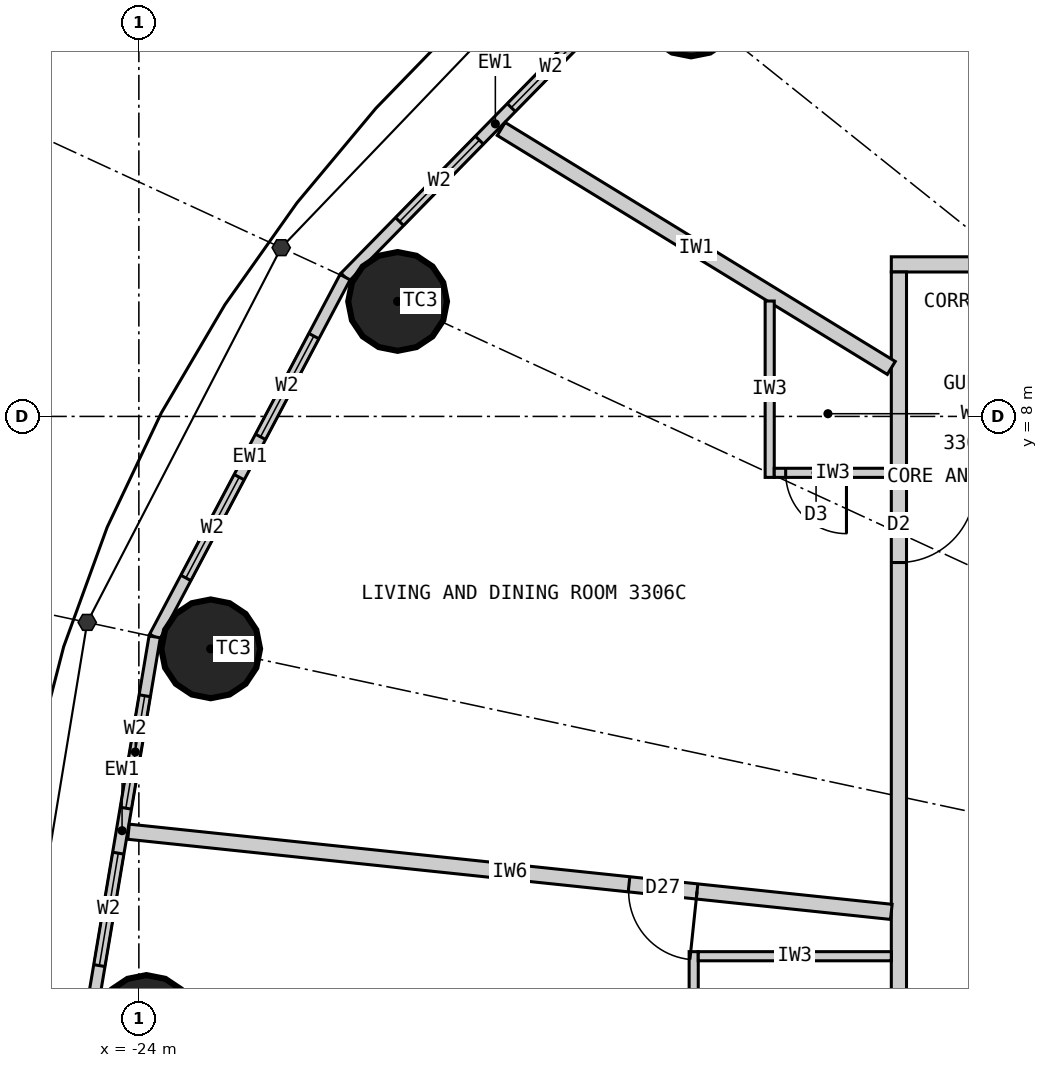
"""IFC4 building model, lengths in metres.
Left out: names, types, materials, properties, quantities, classifications, styles, units other than length and angle.
Written with IfcOpenShell. Run it as: python <this file> out.ifc"""

import sys

from ifc_helpers import new_model, si_unit, direction, frame, frame_2d, origin, origin_2d, place, context, subcontext, project, spatial, rectangle, circle, extrude, element, fill, save


model = new_model("IFC4")
c1 = context("Model", 3, precision=1e-05, world=origin(), true_north=direction((0.0, 1.0)))
c2 = subcontext(c1, "Body", "Model", "MODEL_VIEW")
j1 = project(units=[si_unit("LENGTHUNIT", "METRE"), si_unit("PLANEANGLEUNIT", "RADIAN")], contexts=[c1])
p1 = place(None, origin())
s1 = spatial("IfcSite", under=j1, at=p1, CompositionType="ELEMENT")
p2 = place(p1, origin())
s2 = spatial("IfcBuilding", under=s1, at=p2, CompositionType="ELEMENT")
p3 = place(p2, frame((0.0, 0.0, 128.7)))
s3 = spatial("IfcBuildingStorey", under=s2, at=p3, CompositionType="ELEMENT", Elevation=128.7)
for number, where, z_axis, x_axis in (
    (1, (-16.734, 13.387, 0.0), (0.0, 0.0, 1.0), (1.0, 0.0, 0.0)),
    (2, (-20.596, 9.513, 0.0), (0.0, 0.0, 1.0), (1.0, 0.0, 0.0)),
    (3, (-23.055, 4.942, 0.0), (0.0, 0.0, 1.0), (1.0, 0.0, 0.0)),
    (4, (-23.9, 0.0, 0.0), (0.0, 0.0, 1.0), (1.0, 0.0, 0.0)),
):
    element("IfcColumn", number, at=place(p3, frame(where, z_axis=z_axis, x_axis=x_axis)), inside=s3, PredefinedType="COLUMN", context=c2, shape_type="SweptSolid", body=[
        extrude(circle(Radius=0.65, at=origin_2d()), origin(), (0.0, 0.0, 1.0), 3.3),
    ])
p4 = place(p3, frame((-17.332, 13.866, 0.0), z_axis=(0.0, 0.0, 1.0), x_axis=(-0.700136650834, -0.714008872605, 0.0)))
e5 = element("IfcWall", 5, at=p4, inside=s3, PredefinedType="ELEMENTEDWALL", context=c2, shape_type="SweptSolid", body=[
    extrude(rectangle(XDim=5.649, YDim=0.15, at=frame_2d((2.825, 0.0))), origin(), (0.0, 0.0, 1.0), 3.12),
])
p5 = place(p4, frame((1.025, 0.0, 0.9)))
e6 = element("IfcOpeningElement", 6, at=p5, cuts=e5, PredefinedType="OPENING", context=c2, shape_type="SweptSolid", body=[
    extrude(rectangle(XDim=1.5, YDim=1.9, at=frame_2d((0.75, 0.95))), frame((0.0, 0.085, 0.0), z_axis=(0.0, -1.0, 0.0), x_axis=(1.0, 0.0, 0.0)), (0.0, 0.0, 1.0), 0.17),
])
p6 = place(p4, frame((3.125, 0.0, 0.9)))
e7 = element("IfcOpeningElement", 7, at=p6, cuts=e5, PredefinedType="OPENING", context=c2, shape_type="SweptSolid", body=[
    extrude(rectangle(XDim=1.5, YDim=1.9, at=frame_2d((0.75, 0.95))), frame((0.0, 0.085, 0.0), z_axis=(0.0, -1.0, 0.0), x_axis=(1.0, 0.0, 0.0)), (0.0, 0.0, 1.0), 0.17),
])
p7 = place(p3, frame((-21.287, 9.832, 0.0), z_axis=(0.0, 0.0, 1.0), x_axis=(-0.467814388454, -0.883826735257, 0.0)))
e8 = element("IfcWall", 8, at=p7, inside=s3, PredefinedType="ELEMENTEDWALL", context=c2, shape_type="SweptSolid", body=[
    extrude(rectangle(XDim=5.354, YDim=0.15, at=frame_2d((2.677, 0.0))), origin(), (0.0, 0.0, 1.0), 3.12),
])
p8 = place(p7, frame((0.877, 0.0, 0.9)))
e9 = element("IfcOpeningElement", 9, at=p8, cuts=e8, PredefinedType="OPENING", context=c2, shape_type="SweptSolid", body=[
    extrude(rectangle(XDim=1.5, YDim=1.9, at=frame_2d((0.75, 0.95))), frame((0.0, 0.085, 0.0), z_axis=(0.0, -1.0, 0.0), x_axis=(1.0, 0.0, 0.0)), (0.0, 0.0, 1.0), 0.17),
])
p9 = place(p7, frame((2.977, 0.0, 0.9)))
e10 = element("IfcOpeningElement", 10, at=p9, cuts=e8, PredefinedType="OPENING", context=c2, shape_type="SweptSolid", body=[
    extrude(rectangle(XDim=1.5, YDim=1.9, at=frame_2d((0.75, 0.95))), frame((0.0, 0.085, 0.0), z_axis=(0.0, -1.0, 0.0), x_axis=(1.0, 0.0, 0.0)), (0.0, 0.0, 1.0), 0.17),
])
p10 = place(p3, frame((-23.792, 5.1, 0.0), z_axis=(0.0, 0.0, 1.0), x_axis=(-0.165883894218, -0.986145290329, 0.0)))
e11 = element("IfcWall", 11, at=p10, inside=s3, PredefinedType="ELEMENTEDWALL", context=c2, shape_type="SweptSolid", body=[
    extrude(rectangle(XDim=5.172, YDim=0.15, at=frame_2d((2.586, 0.0))), origin(), (0.0, 0.0, 1.0), 3.12),
])
p11 = place(p10, frame((0.786, 0.0, 0.9)))
e12 = element("IfcOpeningElement", 12, at=p11, cuts=e11, PredefinedType="OPENING", context=c2, shape_type="SweptSolid", body=[
    extrude(rectangle(XDim=1.5, YDim=1.9, at=frame_2d((0.75, 0.95))), frame((0.0, 0.085, 0.0), z_axis=(0.0, -1.0, 0.0), x_axis=(1.0, 0.0, 0.0)), (0.0, 0.0, 1.0), 0.17),
])
p12 = place(p10, frame((2.886, 0.0, 0.9)))
e13 = element("IfcOpeningElement", 13, at=p12, cuts=e11, PredefinedType="OPENING", context=c2, shape_type="SweptSolid", body=[
    extrude(rectangle(XDim=1.5, YDim=1.9, at=frame_2d((0.75, 0.95))), frame((0.0, 0.085, 0.0), z_axis=(0.0, -1.0, 0.0), x_axis=(1.0, 0.0, 0.0)), (0.0, 0.0, 1.0), 0.17),
])
p13 = place(p3, frame((-14.1, 10.0, 0.0), z_axis=(0.0, 0.0, 1.0), x_axis=(1.0, 0.0, 0.0)))
e14 = element("IfcWall", 14, at=p13, inside=s3, PredefinedType="PARTITIONING", context=c2, shape_type="SweptSolid", body=[
    extrude(rectangle(XDim=12.535, YDim=0.2, at=frame_2d((6.268, 0.0))), origin(), (0.0, 0.0, 1.0), 3.12),
])
p14 = place(p13, frame((2.801, 0.0, 0.0)))
e15 = element("IfcOpeningElement", 15, at=p14, cuts=e14, PredefinedType="OPENING", context=c2, shape_type="SweptSolid", body=[
    extrude(rectangle(XDim=1.0, YDim=2.2, at=frame_2d((0.5, 1.1))), frame((0.0, 0.11, 0.0), z_axis=(0.0, -1.0, 0.0), x_axis=(1.0, 0.0, 0.0)), (0.0, 0.0, 1.0), 0.22),
])
p15 = place(p3, frame((-14.0, 9.9, 0.0), z_axis=(0.0, 0.0, 1.0), x_axis=(0.0, -1.0, 0.0)))
e16 = element("IfcWall", 16, at=p15, inside=s3, PredefinedType="PARTITIONING", context=c2, shape_type="SweptSolid", body=[
    extrude(rectangle(XDim=19.8, YDim=0.2, at=frame_2d((9.9, 0.0))), origin(), (0.0, 0.0, 1.0), 3.12),
])
p16 = place(p15, frame((2.822, 0.0, 0.0)))
e17 = element("IfcOpeningElement", 17, at=p16, cuts=e16, PredefinedType="OPENING", context=c2, shape_type="SweptSolid", body=[
    extrude(rectangle(XDim=1.0, YDim=2.2, at=frame_2d((0.5, 1.1))), frame((0.0, 0.11, 0.0), z_axis=(0.0, -1.0, 0.0), x_axis=(1.0, 0.0, 0.0)), (0.0, 0.0, 1.0), 0.22),
])
p17 = place(p15, frame((13.742, 0.0, 0.0)))
e18 = element("IfcOpeningElement", 18, at=p17, cuts=e16, PredefinedType="OPENING", context=c2, shape_type="SweptSolid", body=[
    extrude(rectangle(XDim=1.0, YDim=2.2, at=frame_2d((0.5, 1.1))), frame((0.0, 0.11, 0.0), z_axis=(0.0, -1.0, 0.0), x_axis=(1.0, 0.0, 0.0)), (0.0, 0.0, 1.0), 0.22),
])
p18 = place(p15, frame((18.698, 0.0, 0.0)))
e19 = element("IfcOpeningElement", 19, at=p18, cuts=e16, PredefinedType="OPENING", context=c2, shape_type="SweptSolid", body=[
    extrude(rectangle(XDim=1.0, YDim=2.2, at=frame_2d((0.5, 1.1))), frame((0.0, 0.11, 0.0), z_axis=(0.0, -1.0, 0.0), x_axis=(1.0, 0.0, 0.0)), (0.0, 0.0, 1.0), 0.22),
])
p19 = place(p3, frame((-14.1, 8.638, 0.0), z_axis=(0.0, 0.0, 1.0), x_axis=(-0.852706758009, 0.5223898782, 0.0)))
e20 = element("IfcWall", 20, at=p19, inside=s3, PredefinedType="PARTITIONING", context=c2, shape_type="SweptSolid", body=[
    extrude(rectangle(XDim=6.019, YDim=0.2, at=frame_2d((3.009, 0.0))), origin(), (0.0, 0.0, 1.0), 3.12),
])
p20 = place(p3, frame((-14.1, 1.482, 0.0), z_axis=(0.0, 0.0, 1.0), x_axis=(-0.994523202615, 0.104516024894, 0.0)))
e21 = element("IfcWall", 21, at=p20, inside=s3, PredefinedType="PARTITIONING", context=c2, shape_type="SweptSolid", body=[
    extrude(rectangle(XDim=10.091, YDim=0.2, at=frame_2d((5.045, 0.0))), origin(), (0.0, 0.0, 1.0), 2.47),
])
p21 = place(p20, frame((2.57, 0.0, 0.0)))
e22 = element("IfcOpeningElement", 22, at=p21, cuts=e21, PredefinedType="OPENING", context=c2, shape_type="SweptSolid", body=[
    extrude(rectangle(XDim=0.9, YDim=2.1, at=frame_2d((0.45, 1.05))), frame((0.0, 0.11, 0.0), z_axis=(0.0, -1.0, 0.0), x_axis=(1.0, 0.0, 0.0)), (0.0, 0.0, 1.0), 0.22),
])
p22 = place(p3, frame((-15.7, 9.518, 0.0), z_axis=(0.0, 0.0, 1.0), x_axis=(0.0, -1.0, 0.0)))
e23 = element("IfcWall", 23, at=p22, inside=s3, PredefinedType="PARTITIONING", context=c2, shape_type="SweptSolid", body=[
    extrude(rectangle(XDim=2.32, YDim=0.12, at=frame_2d((1.16, 0.0))), origin(), (0.0, 0.0, 1.0), 3.12),
])
p23 = place(p3, frame((-14.1, 7.258, 0.0), z_axis=(0.0, 0.0, 1.0), x_axis=(-1.0, 0.0, 0.0)))
e24 = element("IfcWall", 24, at=p23, inside=s3, PredefinedType="PARTITIONING", context=c2, shape_type="SweptSolid", body=[
    extrude(rectangle(XDim=1.54, YDim=0.12, at=frame_2d((0.77, 0.0))), origin(), (0.0, 0.0, 1.0), 3.12),
])
p24 = place(p23, frame((0.59, 0.0, 0.0)))
e25 = element("IfcOpeningElement", 25, at=p24, cuts=e24, PredefinedType="OPENING", context=c2, shape_type="SweptSolid", body=[
    extrude(rectangle(XDim=0.8, YDim=2.1, at=frame_2d((0.4, 1.05))), frame((0.0, 0.07, 0.0), z_axis=(0.0, -1.0, 0.0), x_axis=(1.0, 0.0, 0.0)), (0.0, 0.0, 1.0), 0.14),
])
p25 = place(p3, frame((-16.7, -1.655, 0.0), z_axis=(0.0, 0.0, 1.0), x_axis=(0.0, 1.0, 0.0)))
e26 = element("IfcWall", 26, at=p25, inside=s3, PredefinedType="PARTITIONING", context=c2, shape_type="SweptSolid", body=[
    extrude(rectangle(XDim=2.613, YDim=0.12, at=frame_2d((1.307, 0.0))), origin(), (0.0, 0.0, 1.0), 3.12),
])
p26 = place(p25, frame((0.906, 0.0, 0.0)))
e27 = element("IfcOpeningElement", 27, at=p26, cuts=e26, PredefinedType="OPENING", context=c2, shape_type="SweptSolid", body=[
    extrude(rectangle(XDim=0.8, YDim=2.1, at=frame_2d((0.4, 1.05))), frame((0.0, 0.07, 0.0), z_axis=(0.0, -1.0, 0.0), x_axis=(1.0, 0.0, 0.0)), (0.0, 0.0, 1.0), 0.14),
])
p27 = place(p3, frame((-14.1, 0.898, 0.0), z_axis=(0.0, 0.0, 1.0), x_axis=(-1.0, 0.0, 0.0)))
e28 = element("IfcWall", 28, at=p27, inside=s3, PredefinedType="PARTITIONING", context=c2, shape_type="SweptSolid", body=[
    extrude(rectangle(XDim=2.54, YDim=0.12, at=frame_2d((1.27, 0.0))), origin(), (0.0, 0.0, 1.0), 3.12),
])
p28 = place(p5, origin())
e29 = element("IfcWindow", 29, at=p28, inside=s3, PartitioningType="SINGLE_PANEL", PredefinedType="WINDOW", context=c2, shape_type="SweptSolid", body=[
    extrude(rectangle(XDim=1.5, YDim=1.9, at=frame_2d((0.75, 0.95))), frame((0.0, 0.03, 0.0), z_axis=(0.0, -1.0, 0.0), x_axis=(1.0, 0.0, 0.0)), (0.0, 0.0, 1.0), 0.06),
])
fill(e6, e29)
p29 = place(p6, origin())
e30 = element("IfcWindow", 30, at=p29, inside=s3, PartitioningType="SINGLE_PANEL", PredefinedType="WINDOW", context=c2, shape_type="SweptSolid", body=[
    extrude(rectangle(XDim=1.5, YDim=1.9, at=frame_2d((0.75, 0.95))), frame((0.0, 0.03, 0.0), z_axis=(0.0, -1.0, 0.0), x_axis=(1.0, 0.0, 0.0)), (0.0, 0.0, 1.0), 0.06),
])
fill(e7, e30)
p30 = place(p8, origin())
e31 = element("IfcWindow", 31, at=p30, inside=s3, PartitioningType="SINGLE_PANEL", PredefinedType="WINDOW", context=c2, shape_type="SweptSolid", body=[
    extrude(rectangle(XDim=1.5, YDim=1.9, at=frame_2d((0.75, 0.95))), frame((0.0, 0.03, 0.0), z_axis=(0.0, -1.0, 0.0), x_axis=(1.0, 0.0, 0.0)), (0.0, 0.0, 1.0), 0.06),
])
fill(e9, e31)
p31 = place(p9, origin())
e32 = element("IfcWindow", 32, at=p31, inside=s3, PartitioningType="SINGLE_PANEL", PredefinedType="WINDOW", context=c2, shape_type="SweptSolid", body=[
    extrude(rectangle(XDim=1.5, YDim=1.9, at=frame_2d((0.75, 0.95))), frame((0.0, 0.03, 0.0), z_axis=(0.0, -1.0, 0.0), x_axis=(1.0, 0.0, 0.0)), (0.0, 0.0, 1.0), 0.06),
])
fill(e10, e32)
p32 = place(p11, origin())
e33 = element("IfcWindow", 33, at=p32, inside=s3, PartitioningType="SINGLE_PANEL", PredefinedType="WINDOW", context=c2, shape_type="SweptSolid", body=[
    extrude(rectangle(XDim=1.5, YDim=1.9, at=frame_2d((0.75, 0.95))), frame((0.0, 0.03, 0.0), z_axis=(0.0, -1.0, 0.0), x_axis=(1.0, 0.0, 0.0)), (0.0, 0.0, 1.0), 0.06),
])
fill(e12, e33)
p33 = place(p12, origin())
e34 = element("IfcWindow", 34, at=p33, inside=s3, PartitioningType="SINGLE_PANEL", PredefinedType="WINDOW", context=c2, shape_type="SweptSolid", body=[
    extrude(rectangle(XDim=1.5, YDim=1.9, at=frame_2d((0.75, 0.95))), frame((0.0, 0.03, 0.0), z_axis=(0.0, -1.0, 0.0), x_axis=(1.0, 0.0, 0.0)), (0.0, 0.0, 1.0), 0.06),
])
fill(e13, e34)
p34 = place(p24, origin())
e35 = element("IfcDoor", 35, at=p34, inside=s3, OperationType="SINGLE_SWING_LEFT", PredefinedType="DOOR", context=c2, shape_type="SweptSolid", body=[
    extrude(rectangle(XDim=0.8, YDim=2.1, at=frame_2d((0.4, 1.05))), frame((0.0, 0.025, 0.0), z_axis=(0.0, -1.0, 0.0), x_axis=(1.0, 0.0, 0.0)), (0.0, 0.0, 1.0), 0.05),
])
fill(e25, e35)
p35 = place(p16, origin())
e36 = element("IfcDoor", 36, at=p35, inside=s3, OperationType="SINGLE_SWING_LEFT", PredefinedType="DOOR", context=c2, shape_type="SweptSolid", body=[
    extrude(rectangle(XDim=1.0, YDim=2.2, at=frame_2d((0.5, 1.1))), frame((0.0, 0.025, 0.0), z_axis=(0.0, -1.0, 0.0), x_axis=(1.0, 0.0, 0.0)), (0.0, 0.0, 1.0), 0.05),
])
fill(e17, e36)
p36 = place(p21, origin())
e37 = element("IfcDoor", 37, at=p36, inside=s3, OperationType="SINGLE_SWING_LEFT", PredefinedType="DOOR", context=c2, shape_type="SweptSolid", body=[
    extrude(rectangle(XDim=0.9, YDim=2.1, at=frame_2d((0.45, 1.05))), frame((0.0, 0.025, 0.0), z_axis=(0.0, -1.0, 0.0), x_axis=(1.0, 0.0, 0.0)), (0.0, 0.0, 1.0), 0.05),
])
fill(e22, e37)
save(model, sys.argv[1])
